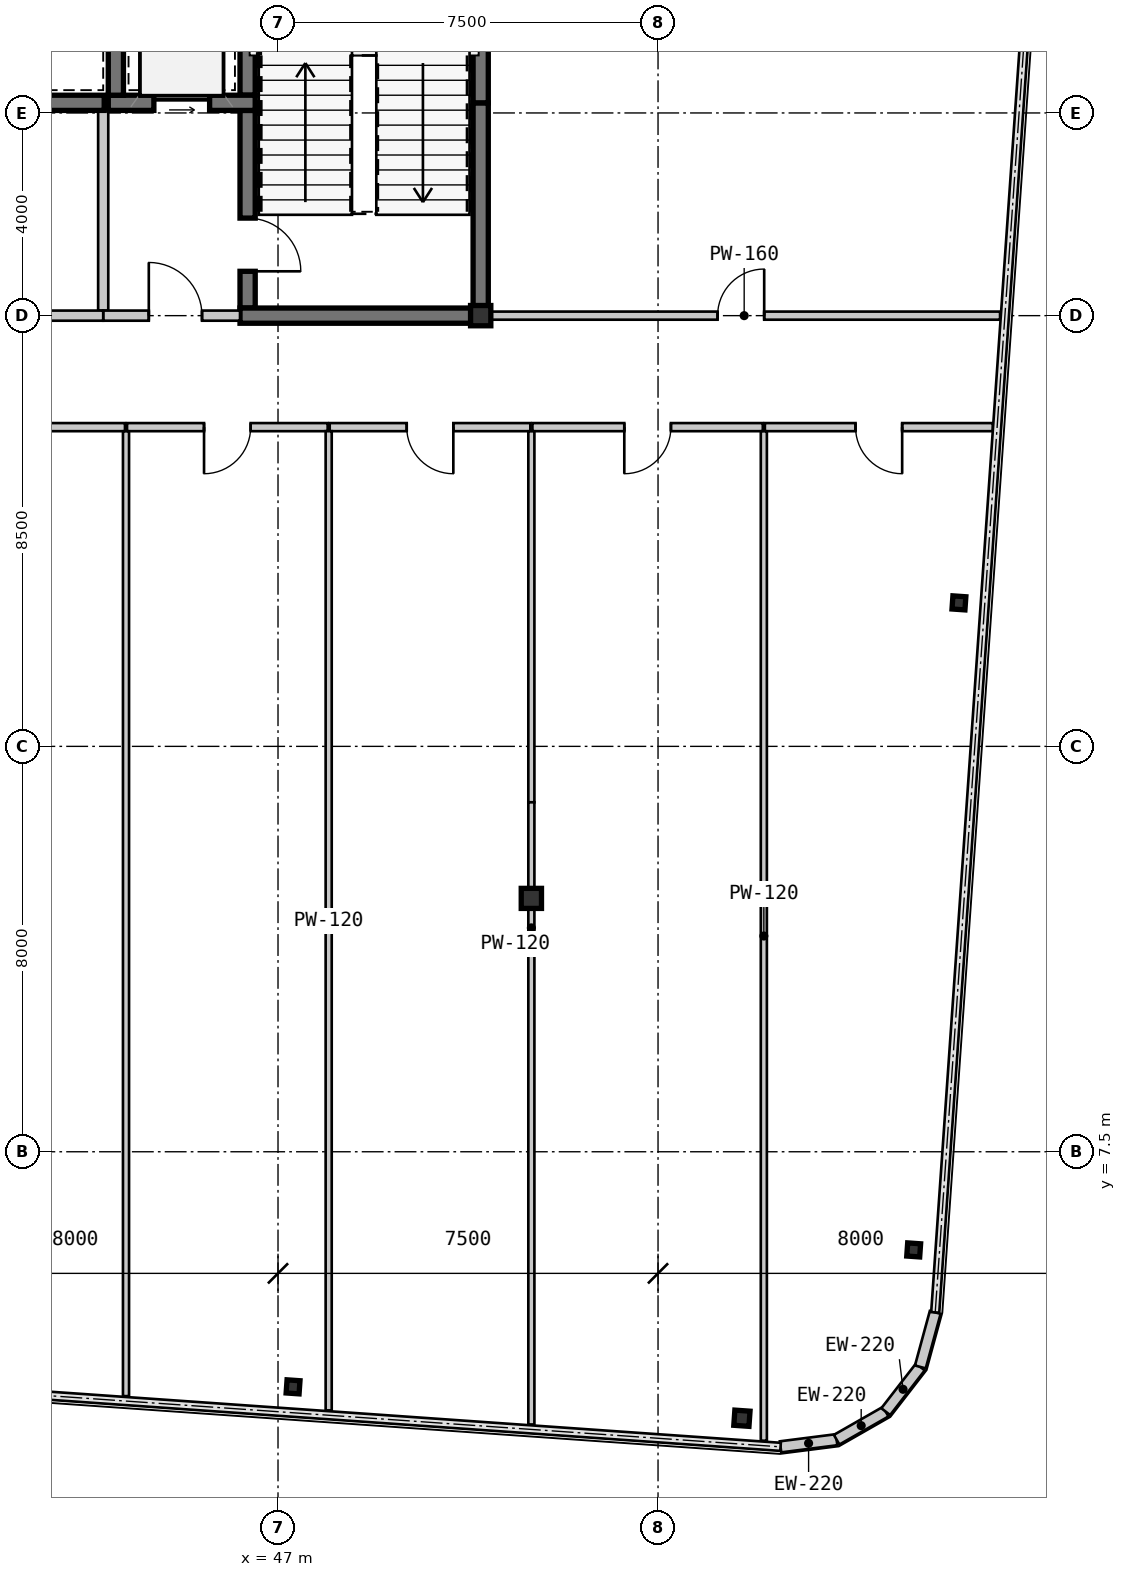
"""IFC4 building model, lengths in metres.
Left out: names, types, materials, properties, quantities, classifications, styles, units other than length and angle.
Written with IfcOpenShell. Run it as: python <this file> out.ifc"""

import sys

from ifc_helpers import new_model, si_unit, direction, frame, frame_2d, origin, origin_2d, place, context, subcontext, project, spatial, rectangle, hollow_rectangle, i_section, extrude, source, transform, mapped, element, fill, save


model = new_model("IFC4")
c1 = context("Model", 3, precision=1e-05, world=origin(), true_north=direction((0.0, 1.0)))
c2 = subcontext(c1, "Body", "Model", "MODEL_VIEW")
j1 = project(units=[si_unit("LENGTHUNIT", "METRE"), si_unit("PLANEANGLEUNIT", "RADIAN")], contexts=[c1])
p1 = place(None, origin())
s1 = spatial("IfcSite", under=j1, at=p1, CompositionType="ELEMENT")
p2 = place(p1, origin())
s2 = spatial("IfcBuilding", under=s1, at=p2, CompositionType="ELEMENT")
p3 = place(p2, frame((0.0, 0.0, 158.2)))
s3 = spatial("IfcBuildingStorey", under=s2, at=p3, CompositionType="ELEMENT", Elevation=158.2)
m1 = source(origin(), c2, "Body", "SweptSolid", [
    extrude(hollow_rectangle(XDim=0.4, YDim=0.4, WallThickness=0.016, at=origin_2d()), origin(), (0.0, 0.0, 1.0), 3.15),
])
p4 = place(p3, frame((51.0, 24.0, 0.0), z_axis=(0.0, 0.0, 1.0), x_axis=(1.0, 0.0, 0.0)))
e1 = element("IfcColumn", 1, at=p4, inside=s3, PredefinedType="COLUMN", context=c2, shape_type="MappedRepresentation", body=[
    mapped(m1, transform((0.0, 0.0, 0.0), scale=1.0)),
])
m2 = source(origin(), c2, "Body", "SweptSolid", [
    extrude(i_section(OverallWidth=0.4, OverallDepth=0.396, WebThickness=0.022, FlangeThickness=0.034, at=origin_2d()), origin(), (0.0, 0.0, 1.0), 3.15),
])
p5 = place(p3, frame((52.0, 12.5, 0.0), z_axis=(0.0, 0.0, 1.0), x_axis=(1.0, 0.0, 0.0)))
e2 = element("IfcColumn", 2, at=p5, inside=s3, PredefinedType="COLUMN", context=c2, shape_type="MappedRepresentation", body=[
    mapped(m2, transform((0.0, 0.0, 0.0), scale=1.0)),
])
m3 = source(origin(), c2, "Body", "SweptSolid", [
    extrude(i_section(OverallWidth=0.256, OverallDepth=0.26, WebThickness=0.01, FlangeThickness=0.017, at=origin_2d()), origin(), (0.0, 0.0, 1.0), 3.15),
])
p6 = place(p3, frame((47.297, 2.861, 0.0), z_axis=(0.0, 0.0, 1.0), x_axis=(0.99756405026, -0.069756473744, 0.0)))
e3 = element("IfcColumn", 3, at=p6, inside=s3, PredefinedType="COLUMN", context=c2, shape_type="MappedRepresentation", body=[
    mapped(m3, transform((0.0, 0.0, 0.0), scale=1.0)),
])
m4 = source(origin(), c2, "Body", "SweptSolid", [
    extrude(hollow_rectangle(XDim=0.3, YDim=0.3, WallThickness=0.012, at=origin_2d()), origin(), (0.0, 0.0, 1.0), 3.15),
])
p7 = place(p3, frame((56.156, 2.241, 0.0), z_axis=(0.0, 0.0, 1.0), x_axis=(0.99756405026, -0.069756473744, 0.0)))
e4 = element("IfcColumn", 4, at=p7, inside=s3, PredefinedType="COLUMN", context=c2, shape_type="MappedRepresentation", body=[
    mapped(m4, transform((0.0, 0.0, 0.0), scale=1.0)),
])
for number, where, z_axis, x_axis in (
    (5, (59.545, 5.563, 0.0), (0.0, 0.0, 1.0), (0.998, -0.07, 0.0)),
    (6, (60.438, 18.332, 0.0), (0.0, 0.0, 1.0), (0.998, -0.07, 0.0)),
):
    element("IfcColumn", number, at=place(p3, frame(where, z_axis=z_axis, x_axis=x_axis)), inside=s3, PredefinedType="COLUMN", context=c2, shape_type="MappedRepresentation", body=[
        mapped(m3, transform((0.0, 0.0, 0.0), scale=1.0)),
    ])
m5 = source(origin(), c2, "Body", "SweptSolid", [
    extrude(rectangle(XDim=1.116, YDim=0.22, at=frame_2d((0.558, 0.0))), origin(), (0.0, 0.0, 1.0), 2.93),
])
p8 = place(p3, frame((56.918, 1.677, 0.0), z_axis=(0.0, 0.0, 1.0), x_axis=(0.99202678349, 0.126027222605, 0.0)))
e7 = element("IfcWall", 7, at=p8, inside=s3, PredefinedType="SOLIDWALL", context=c2, shape_type="MappedRepresentation", body=[
    mapped(m5, transform((0.0, 0.0, 0.0), scale=1.0)),
])
m6 = source(origin(), c2, "Body", "SweptSolid", [
    extrude(rectangle(XDim=1.116, YDim=0.22, at=frame_2d((0.558, 0.0))), origin(), (0.0, 0.0, 1.0), 2.93),
])
for number, where, z_axis, x_axis in (
    (8, (58.025, 1.817, 0.0), (0.0, 0.0, 1.0), (0.868, 0.496, 0.0)),
    (9, (58.994, 2.371, 0.0), (0.0, 0.0, 1.0), (0.612, 0.791, 0.0)),
    (10, (59.677, 3.254, 0.0), (0.0, 0.0, 1.0), (0.263, 0.965, 0.0)),
):
    element("IfcWall", number, at=place(p3, frame(where, z_axis=z_axis, x_axis=x_axis)), inside=s3, PredefinedType="SOLIDWALL", context=c2, shape_type="MappedRepresentation", body=[
        mapped(m6, transform((0.0, 0.0, 0.0), scale=1.0)),
    ])
m7 = source(origin(), c2, "Body", "SweptSolid", [
    extrude(rectangle(XDim=4.05, YDim=0.3, at=frame_2d((2.025, 0.0))), origin(), (0.0, 0.0, 1.0), 2.93),
])
p9 = place(p3, frame((51.0, 24.15, 0.0), z_axis=(0.0, 0.0, 1.0), x_axis=(0.0, 1.0, 0.0)))
e11 = element("IfcWall", 11, at=p9, inside=s3, PredefinedType="SHEAR", context=c2, shape_type="MappedRepresentation", body=[
    mapped(m7, transform((0.0, 0.0, 0.0), scale=1.0)),
])
m8 = source(origin(), c2, "Body", "SweptSolid", [
    extrude(rectangle(XDim=3.65, YDim=0.3, at=frame_2d((1.825, 0.0))), origin(), (0.0, 0.0, 1.0), 2.93),
])
p10 = place(p3, frame((51.0, 28.2, 0.0), z_axis=(0.0, 0.0, 1.0), x_axis=(0.0, 1.0, 0.0)))
e12 = element("IfcWall", 12, at=p10, inside=s3, PredefinedType="SHEAR", context=c2, shape_type="MappedRepresentation", body=[
    mapped(m8, transform((0.0, 0.0, 0.0), scale=1.0)),
])
m9 = source(origin(), c2, "Body", "SweptSolid", [
    extrude(rectangle(XDim=3.5, YDim=0.3, at=frame_2d((1.75, 0.0))), origin(), (0.0, 0.0, 1.0), 2.93),
])
p11 = place(p3, frame((46.4, 31.85, 0.0), z_axis=(0.0, 0.0, 1.0), x_axis=(0.0, -1.0, 0.0)))
e13 = element("IfcWall", 13, at=p11, inside=s3, PredefinedType="SHEAR", context=c2, shape_type="MappedRepresentation", body=[
    mapped(m9, transform((0.0, 0.0, 0.0), scale=1.0)),
])
m10 = source(origin(), c2, "Body", "SweptSolid", [
    extrude(rectangle(XDim=3.9, YDim=0.3, at=frame_2d((1.95, 0.0))), origin(), (0.0, 0.0, 1.0), 2.93),
])
p12 = place(p3, frame((46.4, 28.05, 0.0), z_axis=(0.0, 0.0, 1.0), x_axis=(0.0, -1.0, 0.0)))
e14 = element("IfcWall", 14, at=p12, inside=s3, PredefinedType="SHEAR", context=c2, shape_type="MappedRepresentation", body=[
    mapped(m10, transform((0.0, 0.0, 0.0), scale=1.0)),
])
m11 = source(origin(), c2, "Body", "SweptSolid", [
    extrude(rectangle(XDim=1.05, YDim=2.1, at=frame_2d((0.525, 1.05))), frame((0.0, 0.16, 0.0), z_axis=(0.0, -1.0, 0.0), x_axis=(1.0, 0.0, 0.0)), (0.0, 0.0, 1.0), 0.32),
])
p13 = place(p12, frame((2.125, 0.0, 0.0)))
e15 = element("IfcOpeningElement", 15, at=p13, cuts=e14, PredefinedType="OPENING", context=c2, shape_type="MappedRepresentation", body=[
    mapped(m11, transform((0.0, 0.0, 0.0), scale=1.0)),
])
m12 = source(origin(), c2, "Body", "SweptSolid", [
    extrude(rectangle(XDim=4.9, YDim=0.3, at=frame_2d((2.45, 0.0))), origin(), (0.0, 0.0, 1.0), 2.93),
])
p14 = place(p3, frame((46.25, 24.0, 0.0), z_axis=(0.0, 0.0, 1.0), x_axis=(1.0, 0.0, 0.0)))
e16 = element("IfcWall", 16, at=p14, inside=s3, PredefinedType="SHEAR", context=c2, shape_type="MappedRepresentation", body=[
    mapped(m12, transform((0.0, 0.0, 0.0), scale=1.0)),
])
m13 = source(origin(), c2, "Body", "SweptSolid", [
    extrude(rectangle(XDim=2.9, YDim=0.3, at=frame_2d((1.45, 0.0))), origin(), (0.0, 0.0, 1.0), 2.93),
])
p15 = place(p3, frame((43.65, 28.2, 0.0), z_axis=(0.0, 0.0, 1.0), x_axis=(1.0, 0.0, 0.0)))
e17 = element("IfcWall", 17, at=p15, inside=s3, PredefinedType="SHEAR", context=c2, shape_type="MappedRepresentation", body=[
    mapped(m13, transform((0.0, 0.0, 0.0), scale=1.0)),
])
m14 = source(origin(), c2, "Body", "SweptSolid", [
    extrude(rectangle(XDim=1.1, YDim=2.15, at=frame_2d((0.55, 1.075))), frame((0.0, 0.16, 0.0), z_axis=(0.0, -1.0, 0.0), x_axis=(1.0, 0.0, 0.0)), (0.0, 0.0, 1.0), 0.32),
])
p16 = place(p15, frame((0.9, 0.0, 0.0)))
e18 = element("IfcOpeningElement", 18, at=p16, cuts=e17, PredefinedType="OPENING", context=c2, shape_type="MappedRepresentation", body=[
    mapped(m14, transform((0.0, 0.0, 0.0), scale=1.0)),
])
p17 = place(p3, frame((43.8, 31.85, 0.0), z_axis=(0.0, 0.0, 1.0), x_axis=(0.0, -1.0, 0.0)))
e19 = element("IfcWall", 19, at=p17, inside=s3, PredefinedType="SHEAR", context=c2, shape_type="MappedRepresentation", body=[
    mapped(m9, transform((0.0, 0.0, 0.0), scale=1.0)),
])
m15 = source(origin(), c2, "Body", "SweptSolid", [
    extrude(rectangle(XDim=3.95, YDim=0.2, at=frame_2d((1.975, 0.0))), origin(), (0.0, 0.0, 1.0), 2.93),
])
p18 = place(p3, frame((43.55, 28.05, 0.0), z_axis=(0.0, 0.0, 1.0), x_axis=(0.0, -1.0, 0.0)))
e20 = element("IfcWall", 20, at=p18, inside=s3, PredefinedType="SOLIDWALL", context=c2, shape_type="MappedRepresentation", body=[
    mapped(m15, transform((0.0, 0.0, 0.0), scale=1.0)),
])
m16 = source(origin(), c2, "Body", "SweptSolid", [
    extrude(rectangle(XDim=2.7, YDim=0.2, at=frame_2d((1.35, 0.0))), origin(), (0.0, 0.0, 1.0), 2.397),
])
p19 = place(p3, frame((43.55, 24.0, 0.0), z_axis=(0.0, 0.0, 1.0), x_axis=(1.0, 0.0, 0.0)))
e21 = element("IfcWall", 21, at=p19, inside=s3, PredefinedType="SOLIDWALL", context=c2, shape_type="MappedRepresentation", body=[
    mapped(m16, transform((0.0, 0.0, 0.0), scale=1.0)),
])
m17 = source(origin(), c2, "Body", "SweptSolid", [
    extrude(rectangle(XDim=1.05, YDim=2.1, at=frame_2d((0.525, 1.05))), frame((0.0, 0.11, 0.0), z_axis=(0.0, -1.0, 0.0), x_axis=(1.0, 0.0, 0.0)), (0.0, 0.0, 1.0), 0.22),
])
p20 = place(p19, frame((0.9, 0.0, 0.0)))
e22 = element("IfcOpeningElement", 22, at=p20, cuts=e21, PredefinedType="OPENING", context=c2, shape_type="MappedRepresentation", body=[
    mapped(m17, transform((0.0, 0.0, 0.0), scale=1.0)),
])
m18 = source(origin(), c2, "Body", "SweptSolid", [
    extrude(rectangle(XDim=2.07, YDim=0.3, at=frame_2d((1.035, 0.0))), origin(), (0.0, 0.0, 1.0), 2.93),
])
p21 = place(p3, frame((41.5, 28.2, 0.0), z_axis=(0.0, 0.0, 1.0), x_axis=(1.0, 0.0, 0.0)))
e23 = element("IfcWall", 23, at=p21, inside=s3, PredefinedType="SHEAR", context=c2, shape_type="MappedRepresentation", body=[
    mapped(m18, transform((0.0, 0.0, 0.0), scale=1.0)),
])
m19 = source(origin(), c2, "Body", "SweptSolid", [
    extrude(rectangle(XDim=2.05, YDim=0.2, at=frame_2d((1.025, 0.0))), origin(), (0.0, 0.0, 1.0), 2.397),
])
p22 = place(p3, frame((43.55, 24.0, 0.0), z_axis=(0.0, 0.0, 1.0), x_axis=(-1.0, 0.0, 0.0)))
e24 = element("IfcWall", 24, at=p22, inside=s3, PredefinedType="SOLIDWALL", context=c2, shape_type="MappedRepresentation", body=[
    mapped(m19, transform((0.0, 0.0, 0.0), scale=1.0)),
])
m20 = source(origin(), c2, "Body", "SweptSolid", [
    extrude(rectangle(XDim=4.459, YDim=0.16, at=frame_2d((2.23, 0.0))), origin(), (0.0, 0.0, 1.0), 2.93),
])
p23 = place(p3, frame((43.98, 21.8, 0.0), z_axis=(0.0, 0.0, 1.0), x_axis=(-1.0, 0.0, 0.0)))
e25 = element("IfcWall", 25, at=p23, inside=s3, PredefinedType="PARTITIONING", context=c2, shape_type="MappedRepresentation", body=[
    mapped(m20, transform((0.0, 0.0, 0.0), scale=1.0)),
])
m21 = source(origin(), c2, "Body", "SweptSolid", [
    extrude(rectangle(XDim=0.92, YDim=2.1, at=frame_2d((0.46, 1.05))), frame((0.0, 0.09, 0.0), z_axis=(0.0, -1.0, 0.0), x_axis=(1.0, 0.0, 0.0)), (0.0, 0.0, 1.0), 0.18),
])
p24 = place(p23, frame((1.77, 0.0, 0.0)))
e26 = element("IfcOpeningElement", 26, at=p24, cuts=e25, PredefinedType="OPENING", context=c2, shape_type="MappedRepresentation", body=[
    mapped(m21, transform((0.0, 0.0, 0.0), scale=1.0)),
])
m22 = source(origin(), c2, "Body", "SweptSolid", [
    extrude(rectangle(XDim=3.959, YDim=0.16, at=frame_2d((1.98, 0.0))), origin(), (0.0, 0.0, 1.0), 2.93),
])
p25 = place(p3, frame((47.98, 21.8, 0.0), z_axis=(0.0, 0.0, 1.0), x_axis=(-1.0, 0.0, 0.0)))
e27 = element("IfcWall", 27, at=p25, inside=s3, PredefinedType="PARTITIONING", context=c2, shape_type="MappedRepresentation", body=[
    mapped(m22, transform((0.0, 0.0, 0.0), scale=1.0)),
])
p26 = place(p25, frame((1.52, 0.0, 0.0)))
e28 = element("IfcOpeningElement", 28, at=p26, cuts=e27, PredefinedType="OPENING", context=c2, shape_type="MappedRepresentation", body=[
    mapped(m21, transform((0.0, 0.0, 0.0), scale=1.0)),
])
p27 = place(p3, frame((51.98, 21.8, 0.0), z_axis=(0.0, 0.0, 1.0), x_axis=(-1.0, 0.0, 0.0)))
e29 = element("IfcWall", 29, at=p27, inside=s3, PredefinedType="PARTITIONING", context=c2, shape_type="MappedRepresentation", body=[
    mapped(m22, transform((0.0, 0.0, 0.0), scale=1.0)),
])
p28 = place(p27, frame((1.52, 0.0, 0.0)))
e30 = element("IfcOpeningElement", 30, at=p28, cuts=e29, PredefinedType="OPENING", context=c2, shape_type="MappedRepresentation", body=[
    mapped(m21, transform((0.0, 0.0, 0.0), scale=1.0)),
])
m23 = source(origin(), c2, "Body", "SweptSolid", [
    extrude(rectangle(XDim=4.547, YDim=0.16, at=frame_2d((2.274, 0.0))), origin(), (0.0, 0.0, 1.0), 2.93),
])
p29 = place(p3, frame((56.568, 21.8, 0.0), z_axis=(0.0, 0.0, 1.0), x_axis=(-1.0, 0.0, 0.0)))
e31 = element("IfcWall", 31, at=p29, inside=s3, PredefinedType="PARTITIONING", context=c2, shape_type="MappedRepresentation", body=[
    mapped(m23, transform((0.0, 0.0, 0.0), scale=1.0)),
])
p30 = place(p29, frame((1.814, 0.0, 0.0)))
e32 = element("IfcOpeningElement", 32, at=p30, cuts=e31, PredefinedType="OPENING", context=c2, shape_type="MappedRepresentation", body=[
    mapped(m21, transform((0.0, 0.0, 0.0), scale=1.0)),
])
m24 = source(origin(), c2, "Body", "SweptSolid", [
    extrude(rectangle(XDim=4.499, YDim=0.16, at=frame_2d((2.25, 0.0))), origin(), (0.0, 0.0, 1.0), 2.93),
])
p31 = place(p3, frame((61.107, 21.8, 0.0), z_axis=(0.0, 0.0, 1.0), x_axis=(-1.0, 0.0, 0.0)))
e33 = element("IfcWall", 33, at=p31, inside=s3, PredefinedType="PARTITIONING", context=c2, shape_type="MappedRepresentation", body=[
    mapped(m24, transform((0.0, 0.0, 0.0), scale=1.0)),
])
p32 = place(p31, frame((1.79, 0.0, 0.0)))
e34 = element("IfcOpeningElement", 34, at=p32, cuts=e33, PredefinedType="OPENING", context=c2, shape_type="MappedRepresentation", body=[
    mapped(m21, transform((0.0, 0.0, 0.0), scale=1.0)),
])
m25 = source(origin(), c2, "Body", "SweptSolid", [
    extrude(rectangle(XDim=10.1, YDim=0.16, at=frame_2d((5.05, 0.0))), origin(), (0.0, 0.0, 1.0), 2.93),
])
p33 = place(p3, frame((51.15, 24.0, 0.0), z_axis=(0.0, 0.0, 1.0), x_axis=(1.0, 0.0, 0.0)))
e35 = element("IfcWall", 35, at=p33, inside=s3, PredefinedType="PARTITIONING", context=c2, shape_type="MappedRepresentation", body=[
    mapped(m25, transform((0.0, 0.0, 0.0), scale=1.0)),
])
p34 = place(p33, frame((4.525, 0.0, 0.0)))
e36 = element("IfcOpeningElement", 36, at=p34, cuts=e35, PredefinedType="OPENING", context=c2, shape_type="MappedRepresentation", body=[
    mapped(m21, transform((0.0, 0.0, 0.0), scale=1.0)),
])
m26 = source(origin(), c2, "Body", "SweptSolid", [
    extrude(rectangle(XDim=19.04, YDim=0.12, at=frame_2d((9.52, 0.0))), origin(), (0.0, 0.0, 1.0), 2.93),
])
p35 = place(p3, frame((44.0, 21.718, 0.0), z_axis=(0.0, 0.0, 1.0), x_axis=(0.0, -1.0, 0.0)))
e37 = element("IfcWall", 37, at=p35, inside=s3, PredefinedType="PARTITIONING", context=c2, shape_type="MappedRepresentation", body=[
    mapped(m26, transform((0.0, 0.0, 0.0), scale=1.0)),
])
m27 = source(origin(), c2, "Body", "SweptSolid", [
    extrude(rectangle(XDim=19.324, YDim=0.12, at=frame_2d((9.662, 0.0))), origin(), (0.0, 0.0, 1.0), 2.93),
])
p36 = place(p3, frame((48.0, 21.72, 0.0), z_axis=(0.0, 0.0, 1.0), x_axis=(0.0, -1.0, 0.0)))
e38 = element("IfcWall", 38, at=p36, inside=s3, PredefinedType="PARTITIONING", context=c2, shape_type="MappedRepresentation", body=[
    mapped(m27, transform((0.0, 0.0, 0.0), scale=1.0)),
])
m28 = source(origin(), c2, "Body", "SweptSolid", [
    extrude(rectangle(XDim=7.322, YDim=0.12, at=frame_2d((3.661, 0.0))), origin(), (0.0, 0.0, 1.0), 2.93),
])
p37 = place(p3, frame((52.0, 21.718, 0.0), z_axis=(0.0, 0.0, 1.0), x_axis=(0.0, -1.0, 0.0)))
e39 = element("IfcWall", 39, at=p37, inside=s3, PredefinedType="PARTITIONING", context=c2, shape_type="MappedRepresentation", body=[
    mapped(m28, transform((0.0, 0.0, 0.0), scale=1.0)),
])
m29 = source(origin(), c2, "Body", "SweptSolid", [
    extrude(rectangle(XDim=1.901, YDim=0.12, at=frame_2d((0.951, 0.0))), origin(), (0.0, 0.0, 1.0), 2.397),
])
p38 = place(p3, frame((52.0, 14.396, 0.0), z_axis=(0.0, 0.0, 1.0), x_axis=(0.0, -1.0, 0.0)))
e40 = element("IfcWall", 40, at=p38, inside=s3, PredefinedType="PARTITIONING", context=c2, shape_type="MappedRepresentation", body=[
    mapped(m29, transform((0.0, 0.0, 0.0), scale=1.0)),
])
m30 = source(origin(), c2, "Body", "SweptSolid", [
    extrude(rectangle(XDim=10.376, YDim=0.12, at=frame_2d((5.188, 0.0))), origin(), (0.0, 0.0, 1.0), 2.93),
])
p39 = place(p3, frame((52.0, 12.495, 0.0), z_axis=(0.0, 0.0, 1.0), x_axis=(0.0, -1.0, 0.0)))
e41 = element("IfcWall", 41, at=p39, inside=s3, PredefinedType="PARTITIONING", context=c2, shape_type="MappedRepresentation", body=[
    mapped(m30, transform((0.0, 0.0, 0.0), scale=1.0)),
])
m31 = source(origin(), c2, "Body", "SweptSolid", [
    extrude(rectangle(XDim=19.92, YDim=0.12, at=frame_2d((9.96, 0.0))), origin(), (0.0, 0.0, 1.0), 2.93),
])
p40 = place(p3, frame((56.588, 21.718, 0.0), z_axis=(0.0, 0.0, 1.0), x_axis=(0.0, -1.0, 0.0)))
e42 = element("IfcWall", 42, at=p40, inside=s3, PredefinedType="PARTITIONING", context=c2, shape_type="MappedRepresentation", body=[
    mapped(m31, transform((0.0, 0.0, 0.0), scale=1.0)),
])
m32 = source(origin(), c2, "Body", "SweptSolid", [
    extrude(rectangle(XDim=1.05, YDim=2.1, at=frame_2d((0.525, 1.05))), frame((0.0, 0.025, 0.0), z_axis=(0.0, -1.0, 0.0), x_axis=(1.0, 0.0, 0.0)), (0.0, 0.0, 1.0), 0.05),
])
p41 = place(p13, origin())
e43 = element("IfcDoor", 43, at=p41, inside=s3, OperationType="SINGLE_SWING_RIGHT", PredefinedType="DOOR", context=c2, shape_type="MappedRepresentation", body=[
    mapped(m32, transform((0.0, 0.0, 0.0), scale=1.0)),
])
fill(e15, e43)
m33 = source(origin(), c2, "Body", "SweptSolid", [
    extrude(rectangle(XDim=1.1, YDim=2.15, at=frame_2d((0.55, 1.075))), frame((0.0, 0.025, 0.0), z_axis=(0.0, -1.0, 0.0), x_axis=(1.0, 0.0, 0.0)), (0.0, 0.0, 1.0), 0.05),
])
p42 = place(p16, origin())
e44 = element("IfcDoor", 44, at=p42, inside=s3, OperationType="SLIDING_TO_LEFT", PredefinedType="DOOR", context=c2, shape_type="MappedRepresentation", body=[
    mapped(m33, transform((0.0, 0.0, 0.0), scale=1.0)),
])
fill(e18, e44)
p43 = place(p20, origin())
e45 = element("IfcDoor", 45, at=p43, inside=s3, OperationType="SINGLE_SWING_LEFT", PredefinedType="DOOR", context=c2, shape_type="MappedRepresentation", body=[
    mapped(m32, transform((0.0, 0.0, 0.0), scale=1.0)),
])
fill(e22, e45)
m34 = source(origin(), c2, "Body", "SweptSolid", [
    extrude(rectangle(XDim=0.92, YDim=2.1, at=frame_2d((0.46, 1.05))), frame((0.0, 0.025, 0.0), z_axis=(0.0, -1.0, 0.0), x_axis=(1.0, 0.0, 0.0)), (0.0, 0.0, 1.0), 0.05),
])
p44 = place(p26, origin())
e46 = element("IfcDoor", 46, at=p44, inside=s3, OperationType="SINGLE_SWING_RIGHT", PredefinedType="DOOR", context=c2, shape_type="MappedRepresentation", body=[
    mapped(m34, transform((0.0, 0.0, 0.0), scale=1.0)),
])
fill(e28, e46)
p45 = place(p28, origin())
e47 = element("IfcDoor", 47, at=p45, inside=s3, OperationType="SINGLE_SWING_LEFT", PredefinedType="DOOR", context=c2, shape_type="MappedRepresentation", body=[
    mapped(m34, transform((0.0, 0.0, 0.0), scale=1.0)),
])
fill(e30, e47)
p46 = place(p30, origin())
e48 = element("IfcDoor", 48, at=p46, inside=s3, OperationType="SINGLE_SWING_RIGHT", PredefinedType="DOOR", context=c2, shape_type="MappedRepresentation", body=[
    mapped(m34, transform((0.0, 0.0, 0.0), scale=1.0)),
])
fill(e32, e48)
p47 = place(p32, origin())
e49 = element("IfcDoor", 49, at=p47, inside=s3, OperationType="SINGLE_SWING_LEFT", PredefinedType="DOOR", context=c2, shape_type="MappedRepresentation", body=[
    mapped(m34, transform((0.0, 0.0, 0.0), scale=1.0)),
])
fill(e34, e49)
p48 = place(p34, origin())
e50 = element("IfcDoor", 50, at=p48, inside=s3, OperationType="SINGLE_SWING_RIGHT", PredefinedType="DOOR", context=c2, shape_type="MappedRepresentation", body=[
    mapped(m34, transform((0.0, 0.0, 0.0), scale=1.0)),
])
fill(e36, e50)
save(model, sys.argv[1])
